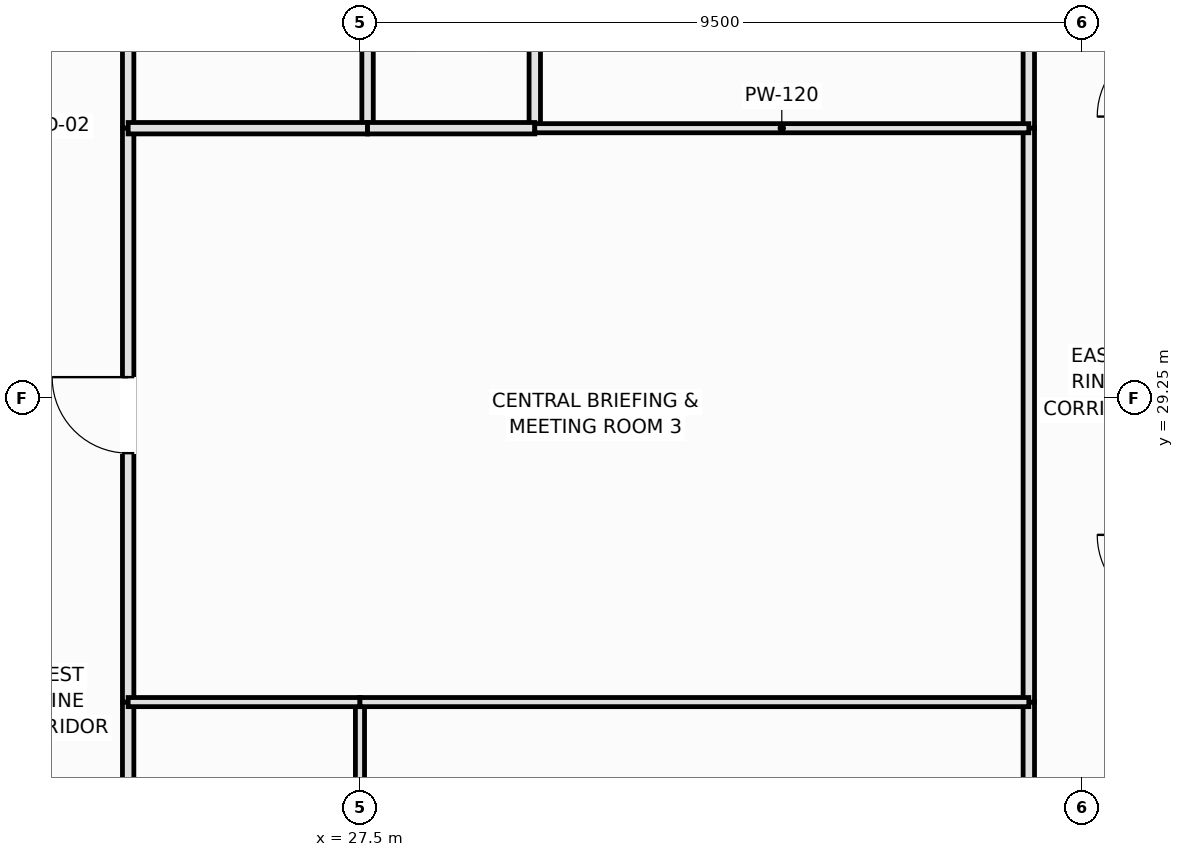
"""IFC4 building model, lengths in metres.
Left out: names, types, materials, properties, quantities, classifications, styles, units other than length and angle.
Written with IfcOpenShell. Run it as: python <this file> out.ifc"""

import sys

from ifc_helpers import new_model, si_unit, direction, frame, frame_2d, origin, place, context, subcontext, project, spatial, rectangle, extrude, element, fill, save


model = new_model("IFC4")
c1 = context("Model", 3, precision=1e-05, world=origin(), true_north=direction((0.0, 1.0)))
c2 = subcontext(c1, "Body", "Model", "MODEL_VIEW")
j1 = project(units=[si_unit("LENGTHUNIT", "METRE"), si_unit("PLANEANGLEUNIT", "RADIAN")], contexts=[c1])
p1 = place(None, origin())
s1 = spatial("IfcSite", under=j1, at=p1, CompositionType="ELEMENT")
p2 = place(p1, origin())
s2 = spatial("IfcBuilding", under=s1, at=p2, CompositionType="ELEMENT")
p3 = place(p2, frame((0.0, 0.0, 61.1)))
s3 = spatial("IfcBuildingStorey", under=s2, at=p3, CompositionType="ELEMENT", Elevation=61.1)
p4 = place(p3, frame((24.45, 32.8, 0.0), z_axis=(0.0, 0.0, 1.0), x_axis=(0.0, 1.0, 0.0)))
e1 = element("IfcWall", 1, at=p4, inside=s3, PredefinedType="PLUMBINGWALL", context=c2, shape_type="SweptSolid", body=[
    extrude(rectangle(XDim=3.1, YDim=0.15, at=frame_2d((1.55, 0.0))), origin(), (0.0, 0.0, 1.0), 3.37),
])
p5 = place(p4, frame((1.1, 0.0, 0.0)))
e2 = element("IfcOpeningElement", 2, at=p5, cuts=e1, PredefinedType="OPENING", context=c2, shape_type="SweptSolid", body=[
    extrude(rectangle(XDim=0.9, YDim=2.1, at=frame_2d((0.45, 1.05))), frame((0.0, 0.085, 0.0), z_axis=(0.0, -1.0, 0.0), x_axis=(1.0, 0.0, 0.0)), (0.0, 0.0, 1.0), 0.17),
])
p6 = place(p3, frame((24.45, 19.6, 0.0), z_axis=(0.0, 0.0, 1.0), x_axis=(0.0, 1.0, 0.0)))
e3 = element("IfcWall", 3, at=p6, inside=s3, PredefinedType="PARTITIONING", context=c2, shape_type="SweptSolid", body=[
    extrude(rectangle(XDim=5.65, YDim=0.15, at=frame_2d((2.825, 0.0))), origin(), (0.0, 0.0, 1.0), 3.37),
])
p7 = place(p6, frame((2.325, 0.0, 0.0)))
e4 = element("IfcOpeningElement", 4, at=p7, cuts=e3, PredefinedType="OPENING", context=c2, shape_type="SweptSolid", body=[
    extrude(rectangle(XDim=1.0, YDim=2.15, at=frame_2d((0.5, 1.075))), frame((0.0, 0.085, 0.0), z_axis=(0.0, -1.0, 0.0), x_axis=(1.0, 0.0, 0.0)), (0.0, 0.0, 1.0), 0.17),
])
p8 = place(p3, frame((24.45, 25.25, 0.0), z_axis=(0.0, 0.0, 1.0), x_axis=(0.0, 1.0, 0.0)))
e5 = element("IfcWall", 5, at=p8, inside=s3, PredefinedType="PARTITIONING", context=c2, shape_type="SweptSolid", body=[
    extrude(rectangle(XDim=7.55, YDim=0.15, at=frame_2d((3.775, 0.0))), origin(), (0.0, 0.0, 1.0), 3.37),
])
p9 = place(p8, frame((3.275, 0.0, 0.0)))
e6 = element("IfcOpeningElement", 6, at=p9, cuts=e5, PredefinedType="OPENING", context=c2, shape_type="SweptSolid", body=[
    extrude(rectangle(XDim=1.0, YDim=2.15, at=frame_2d((0.5, 1.075))), frame((0.0, 0.085, 0.0), z_axis=(0.0, -1.0, 0.0), x_axis=(1.0, 0.0, 0.0)), (0.0, 0.0, 1.0), 0.17),
])
p10 = place(p3, frame((36.3, 32.8, 0.0), z_axis=(0.0, 0.0, 1.0), x_axis=(0.0, 1.0, 0.0)))
e7 = element("IfcWall", 7, at=p10, inside=s3, PredefinedType="PARTITIONING", context=c2, shape_type="SweptSolid", body=[
    extrude(rectangle(XDim=3.1, YDim=0.15, at=frame_2d((1.55, 0.0))), origin(), (0.0, 0.0, 1.0), 3.37),
])
p11 = place(p10, frame((1.05, 0.0, 0.0)))
e8 = element("IfcOpeningElement", 8, at=p11, cuts=e7, PredefinedType="OPENING", context=c2, shape_type="SweptSolid", body=[
    extrude(rectangle(XDim=1.0, YDim=2.15, at=frame_2d((0.5, 1.075))), frame((0.0, 0.085, 0.0), z_axis=(0.0, -1.0, 0.0), x_axis=(1.0, 0.0, 0.0)), (0.0, 0.0, 1.0), 0.17),
])
p12 = place(p3, frame((36.3, 19.6, 0.0), z_axis=(0.0, 0.0, 1.0), x_axis=(0.0, 1.0, 0.0)))
e9 = element("IfcWall", 9, at=p12, inside=s3, PredefinedType="PARTITIONING", context=c2, shape_type="SweptSolid", body=[
    extrude(rectangle(XDim=5.65, YDim=0.15, at=frame_2d((2.825, 0.0))), origin(), (0.0, 0.0, 1.0), 3.37),
])
p13 = place(p12, frame((2.325, 0.0, 0.0)))
e10 = element("IfcOpeningElement", 10, at=p13, cuts=e9, PredefinedType="OPENING", context=c2, shape_type="SweptSolid", body=[
    extrude(rectangle(XDim=1.0, YDim=2.15, at=frame_2d((0.5, 1.075))), frame((0.0, 0.085, 0.0), z_axis=(0.0, -1.0, 0.0), x_axis=(1.0, 0.0, 0.0)), (0.0, 0.0, 1.0), 0.17),
])
p14 = place(p3, frame((36.3, 25.25, 0.0), z_axis=(0.0, 0.0, 1.0), x_axis=(0.0, 1.0, 0.0)))
e11 = element("IfcWall", 11, at=p14, inside=s3, PredefinedType="PARTITIONING", context=c2, shape_type="SweptSolid", body=[
    extrude(rectangle(XDim=7.55, YDim=0.15, at=frame_2d((3.775, 0.0))), origin(), (0.0, 0.0, 1.0), 3.37),
])
p15 = place(p3, frame((27.6, 32.8, 0.0), z_axis=(0.0, 0.0, 1.0), x_axis=(0.0, 1.0, 0.0)))
e12 = element("IfcWall", 12, at=p15, inside=s3, PredefinedType="PLUMBINGWALL", context=c2, shape_type="SweptSolid", body=[
    extrude(rectangle(XDim=3.1, YDim=0.15, at=frame_2d((1.55, 0.0))), origin(), (0.0, 0.0, 1.0), 3.37),
])
p16 = place(p3, frame((24.45, 32.8, 0.0), z_axis=(0.0, 0.0, 1.0), x_axis=(1.0, 0.0, 0.0)))
e13 = element("IfcWall", 13, at=p16, inside=s3, PredefinedType="PLUMBINGWALL", context=c2, shape_type="SweptSolid", body=[
    extrude(rectangle(XDim=3.15, YDim=0.15, at=frame_2d((1.575, 0.0))), origin(), (0.0, 0.0, 1.0), 3.37),
])
p17 = place(p3, frame((29.8, 32.8, 0.0), z_axis=(0.0, 0.0, 1.0), x_axis=(0.0, 1.0, 0.0)))
e14 = element("IfcWall", 14, at=p17, inside=s3, PredefinedType="PLUMBINGWALL", context=c2, shape_type="SweptSolid", body=[
    extrude(rectangle(XDim=3.1, YDim=0.15, at=frame_2d((1.55, 0.0))), origin(), (0.0, 0.0, 1.0), 3.37),
])
p18 = place(p3, frame((27.6, 32.8, 0.0), z_axis=(0.0, 0.0, 1.0), x_axis=(1.0, 0.0, 0.0)))
e15 = element("IfcWall", 15, at=p18, inside=s3, PredefinedType="PLUMBINGWALL", context=c2, shape_type="SweptSolid", body=[
    extrude(rectangle(XDim=2.2, YDim=0.15, at=frame_2d((1.1, 0.0))), origin(), (0.0, 0.0, 1.0), 3.37),
])
p19 = place(p3, frame((29.8, 32.8, 0.0), z_axis=(0.0, 0.0, 1.0), x_axis=(1.0, 0.0, 0.0)))
e16 = element("IfcWall", 16, at=p19, inside=s3, PredefinedType="PARTITIONING", context=c2, shape_type="SweptSolid", body=[
    extrude(rectangle(XDim=6.5, YDim=0.12, at=frame_2d((3.25, 0.0))), origin(), (0.0, 0.0, 1.0), 3.37),
])
p20 = place(p3, frame((27.5, 19.6, 0.0), z_axis=(0.0, 0.0, 1.0), x_axis=(0.0, 1.0, 0.0)))
e17 = element("IfcWall", 17, at=p20, inside=s3, PredefinedType="PARTITIONING", context=c2, shape_type="SweptSolid", body=[
    extrude(rectangle(XDim=5.65, YDim=0.12, at=frame_2d((2.825, 0.0))), origin(), (0.0, 0.0, 1.0), 3.37),
])
p21 = place(p3, frame((24.45, 25.25, 0.0), z_axis=(0.0, 0.0, 1.0), x_axis=(1.0, 0.0, 0.0)))
e18 = element("IfcWall", 18, at=p21, inside=s3, PredefinedType="PARTITIONING", context=c2, shape_type="SweptSolid", body=[
    extrude(rectangle(XDim=3.05, YDim=0.12, at=frame_2d((1.525, 0.0))), origin(), (0.0, 0.0, 1.0), 2.72),
])
p22 = place(p3, frame((27.5, 25.25, 0.0), z_axis=(0.0, 0.0, 1.0), x_axis=(1.0, 0.0, 0.0)))
e19 = element("IfcWall", 19, at=p22, inside=s3, PredefinedType="PARTITIONING", context=c2, shape_type="SweptSolid", body=[
    extrude(rectangle(XDim=8.8, YDim=0.12, at=frame_2d((4.4, 0.0))), origin(), (0.0, 0.0, 1.0), 2.72),
])
p23 = place(p9, origin())
e20 = element("IfcDoor", 20, at=p23, inside=s3, OperationType="SINGLE_SWING_RIGHT", PredefinedType="DOOR", context=c2, shape_type="SweptSolid", body=[
    extrude(rectangle(XDim=1.0, YDim=2.15, at=frame_2d((0.5, 1.075))), frame((0.0, 0.025, 0.0), z_axis=(0.0, -1.0, 0.0), x_axis=(1.0, 0.0, 0.0)), (0.0, 0.0, 1.0), 0.05),
])
fill(e6, e20)
save(model, sys.argv[1])
